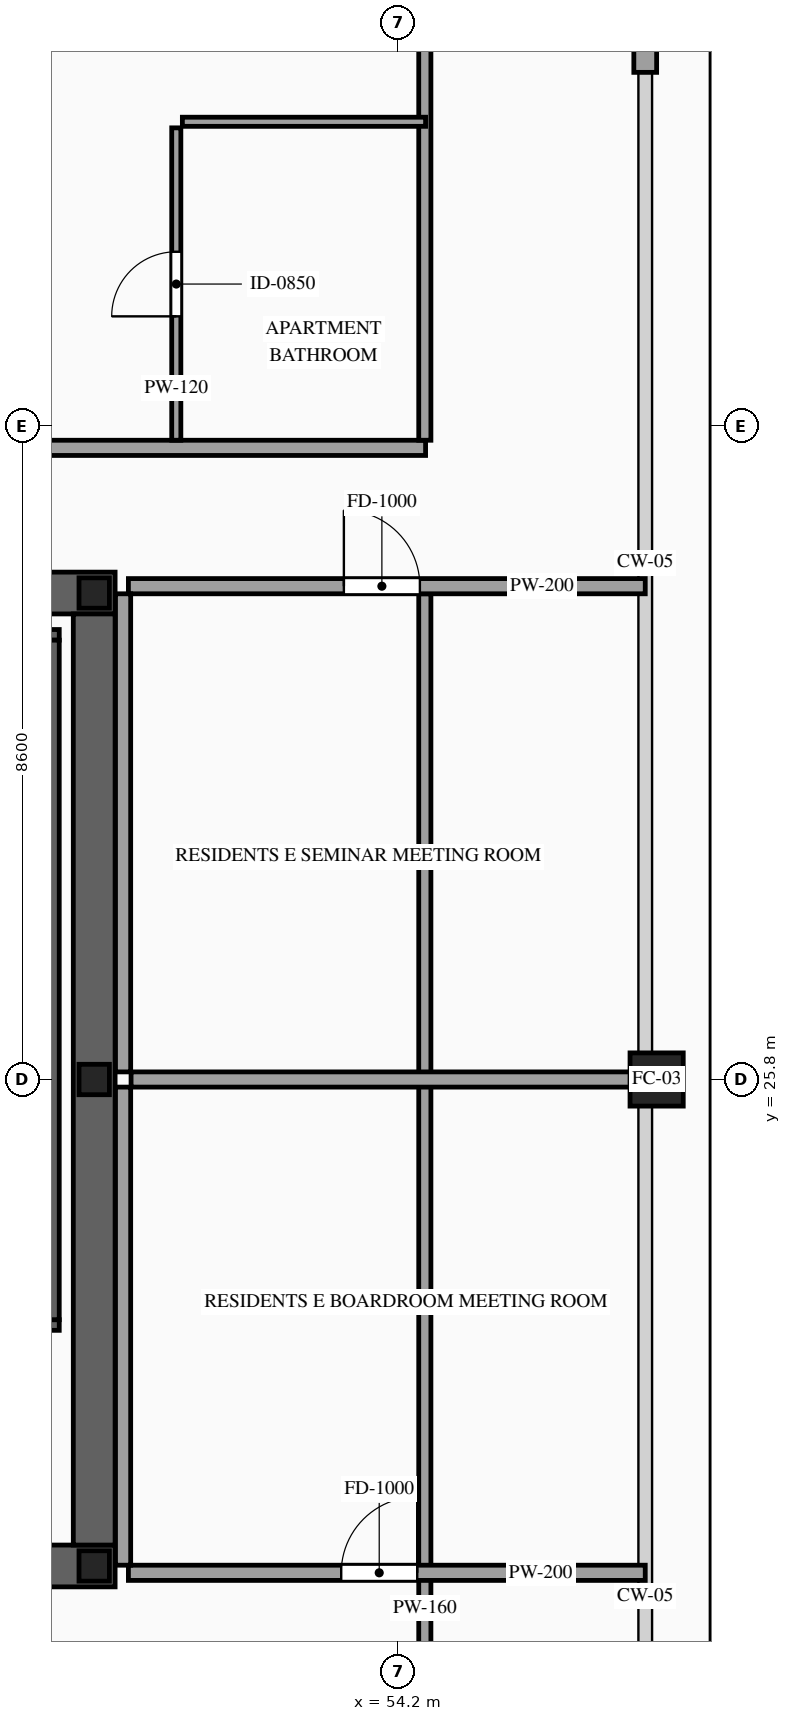
"""IFC4 building model, lengths in metres.
Left out: names, types, materials, properties, quantities, classifications, styles, units other than length and angle.
Written with IfcOpenShell. Run it as: python <this file> out.ifc"""

import sys

from ifc_helpers import new_model, si_unit, direction, frame, frame_2d, origin, origin_2d, place, context, subcontext, project, spatial, rectangle, hollow_rectangle, i_section, extrude, source, transform, mapped, element, fill, save


model = new_model("IFC4")
c1 = context("Model", 3, precision=1e-05, world=origin(), true_north=direction((0.0, 1.0)))
c2 = subcontext(c1, "Body", "Model", "MODEL_VIEW")
j1 = project(units=[si_unit("LENGTHUNIT", "METRE"), si_unit("PLANEANGLEUNIT", "RADIAN")], contexts=[c1])
p1 = place(None, origin())
s1 = spatial("IfcSite", under=j1, at=p1, CompositionType="ELEMENT")
p2 = place(p1, origin())
s2 = spatial("IfcBuilding", under=s1, at=p2, CompositionType="ELEMENT")
p3 = place(p2, frame((0.0, 0.0, 231.1)))
s3 = spatial("IfcBuildingStorey", under=s2, at=p3, CompositionType="ELEMENT", Elevation=231.1)
p4 = place(p3, frame((23.525, 19.4, 0.0), z_axis=(0.0, 0.0, 1.0), x_axis=(1.0, 0.0, 0.0)))
e1 = element("IfcWall", 1, at=p4, inside=s3, PredefinedType="SHEAR", context=c2, shape_type="SweptSolid", body=[
    extrude(rectangle(XDim=26.95, YDim=0.55, at=frame_2d((13.475, 0.0))), origin(), (0.0, 0.0, 1.0), 3.5),
])
p5 = place(p4, frame((1.925, 0.0, 0.0)))
e2 = element("IfcOpeningElement", 2, at=p5, cuts=e1, PredefinedType="OPENING", context=c2, shape_type="SweptSolid", body=[
    extrude(rectangle(XDim=1.1, YDim=2.2, at=frame_2d((0.55, 1.1))), frame((0.0, 0.29, 0.0), z_axis=(0.0, -1.0, 0.0), x_axis=(1.0, 0.0, 0.0)), (0.0, 0.0, 1.0), 0.58),
])
p6 = place(p4, frame((9.825, 0.0, 0.0)))
e3 = element("IfcOpeningElement", 3, at=p6, cuts=e1, PredefinedType="OPENING", context=c2, shape_type="SweptSolid", body=[
    extrude(rectangle(XDim=1.1, YDim=2.2, at=frame_2d((0.55, 1.1))), frame((0.0, 0.29, 0.0), z_axis=(0.0, -1.0, 0.0), x_axis=(1.0, 0.0, 0.0)), (0.0, 0.0, 1.0), 0.58),
])
p7 = place(p4, frame((23.025, 0.0, 0.0)))
e4 = element("IfcOpeningElement", 4, at=p7, cuts=e1, PredefinedType="OPENING", context=c2, shape_type="SweptSolid", body=[
    extrude(rectangle(XDim=1.1, YDim=2.2, at=frame_2d((0.55, 1.1))), frame((0.0, 0.29, 0.0), z_axis=(0.0, -1.0, 0.0), x_axis=(1.0, 0.0, 0.0)), (0.0, 0.0, 1.0), 0.58),
])
p8 = place(p4, frame((19.645, 0.0, 0.0)))
e5 = element("IfcOpeningElement", 5, at=p8, cuts=e1, PredefinedType="OPENING", context=c2, shape_type="SweptSolid", body=[
    extrude(rectangle(XDim=0.9, YDim=2.15, at=frame_2d((0.45, 1.075))), frame((0.0, 0.29, 0.0), z_axis=(0.0, -1.0, 0.0), x_axis=(1.0, 0.0, 0.0)), (0.0, 0.0, 1.0), 0.58),
])
p9 = place(p4, frame((18.205, 0.0, 0.0)))
e6 = element("IfcOpeningElement", 6, at=p9, cuts=e1, PredefinedType="OPENING", context=c2, shape_type="SweptSolid", body=[
    extrude(rectangle(XDim=0.9, YDim=2.15, at=frame_2d((0.45, 1.075))), frame((0.0, 0.29, 0.0), z_axis=(0.0, -1.0, 0.0), x_axis=(1.0, 0.0, 0.0)), (0.0, 0.0, 1.0), 0.58),
])
p10 = place(p3, frame((23.525, 32.2, 0.0), z_axis=(0.0, 0.0, 1.0), x_axis=(1.0, 0.0, 0.0)))
e7 = element("IfcWall", 7, at=p10, inside=s3, PredefinedType="SHEAR", context=c2, shape_type="SweptSolid", body=[
    extrude(rectangle(XDim=26.95, YDim=0.55, at=frame_2d((13.475, 0.0))), origin(), (0.0, 0.0, 1.0), 3.5),
])
p11 = place(p10, frame((4.545, 0.0, 0.0)))
e8 = element("IfcOpeningElement", 8, at=p11, cuts=e7, PredefinedType="OPENING", context=c2, shape_type="SweptSolid", body=[
    extrude(rectangle(XDim=0.9, YDim=2.15, at=frame_2d((0.45, 1.075))), frame((0.0, 0.29, 0.0), z_axis=(0.0, -1.0, 0.0), x_axis=(1.0, 0.0, 0.0)), (0.0, 0.0, 1.0), 0.58),
])
p12 = place(p10, frame((9.825, 0.0, 0.0)))
e9 = element("IfcOpeningElement", 9, at=p12, cuts=e7, PredefinedType="OPENING", context=c2, shape_type="SweptSolid", body=[
    extrude(rectangle(XDim=1.1, YDim=2.2, at=frame_2d((0.55, 1.1))), frame((0.0, 0.29, 0.0), z_axis=(0.0, -1.0, 0.0), x_axis=(1.0, 0.0, 0.0)), (0.0, 0.0, 1.0), 0.58),
])
p13 = place(p10, frame((15.675, 0.0, 0.0)))
e10 = element("IfcOpeningElement", 10, at=p13, cuts=e7, PredefinedType="OPENING", context=c2, shape_type="SweptSolid", body=[
    extrude(rectangle(XDim=1.1, YDim=2.2, at=frame_2d((0.55, 1.1))), frame((0.0, 0.29, 0.0), z_axis=(0.0, -1.0, 0.0), x_axis=(1.0, 0.0, 0.0)), (0.0, 0.0, 1.0), 0.58),
])
p14 = place(p10, frame((19.645, 0.0, 0.0)))
e11 = element("IfcOpeningElement", 11, at=p14, cuts=e7, PredefinedType="OPENING", context=c2, shape_type="SweptSolid", body=[
    extrude(rectangle(XDim=0.9, YDim=2.15, at=frame_2d((0.45, 1.075))), frame((0.0, 0.29, 0.0), z_axis=(0.0, -1.0, 0.0), x_axis=(1.0, 0.0, 0.0)), (0.0, 0.0, 1.0), 0.58),
])
m1 = source(origin(), c2, "Body", "SweptSolid", [
    extrude(rectangle(XDim=12.25, YDim=0.55, at=frame_2d((6.125, 0.0))), origin(), (0.0, 0.0, 1.0), 3.5),
])
p15 = place(p3, frame((50.2, 19.675, 0.0), z_axis=(0.0, 0.0, 1.0), x_axis=(0.0, 1.0, 0.0)))
e12 = element("IfcWall", 12, at=p15, inside=s3, PredefinedType="SHEAR", context=c2, shape_type="MappedRepresentation", body=[
    mapped(m1, transform((0.0, 0.0, 0.0), scale=1.0)),
])
m2 = source(origin(), c2, "Body", "SweptSolid", [
    extrude(i_section(OverallWidth=0.4, OverallDepth=0.4, WebThickness=0.013, FlangeThickness=0.021, at=origin_2d()), origin(), (0.0, 0.0, 1.0), 3.5),
])
for number, where, z_axis, x_axis in (
    (13, (50.2, 19.4, 0.0), (0.0, 0.0, 1.0), (1.0, 0.0, 0.0)),
    (14, (50.2, 25.8, 0.0), (0.0, 0.0, 1.0), (1.0, 0.0, 0.0)),
    (15, (50.2, 32.2, 0.0), (0.0, 0.0, 1.0), (1.0, 0.0, 0.0)),
):
    element("IfcColumn", number, at=place(p3, frame(where, z_axis=z_axis, x_axis=x_axis)), inside=s3, PredefinedType="COLUMN", context=c2, shape_type="MappedRepresentation", body=[
        mapped(m2, transform((0.0, 0.0, 0.0), scale=1.0)),
    ])
m3 = source(origin(), c2, "Body", "SweptSolid", [
    extrude(hollow_rectangle(XDim=0.7, YDim=0.7, WallThickness=0.032, at=origin_2d()), origin(), (0.0, 0.0, 1.0), 3.5),
])
p16 = place(p3, frame((57.6, 25.8, 0.0), z_axis=(0.0, 0.0, 1.0), x_axis=(1.0, 0.0, 0.0)))
e16 = element("IfcColumn", 16, at=p16, inside=s3, PredefinedType="COLUMN", context=c2, shape_type="MappedRepresentation", body=[
    mapped(m3, transform((0.0, 0.0, 0.0), scale=1.0)),
])
m4 = source(origin(), c2, "Body", "SweptSolid", [
    extrude(rectangle(XDim=3.15, YDim=0.3, at=frame_2d((1.575, 0.0))), origin(), (0.0, 0.0, 1.0), 2.835),
])
p17 = place(p3, frame((57.45, 39.05, 0.0), z_axis=(0.0, 0.0, 1.0), x_axis=(0.0, 1.0, 0.0)))
e17 = element("IfcWall", 17, at=p17, inside=s3, PredefinedType="SOLIDWALL", context=c2, shape_type="MappedRepresentation", body=[
    mapped(m4, transform((0.0, 0.0, 0.0), scale=1.0)),
])
p18 = place(p3, frame((46.46, 22.57, 0.0), z_axis=(0.0, 0.0, 1.0), x_axis=(1.0, 0.0, 0.0)))
e18 = element("IfcWall", 18, at=p18, inside=s3, PredefinedType="SOLIDWALL", context=c2, shape_type="SweptSolid", body=[
    extrude(rectangle(XDim=3.28, YDim=0.14, at=frame_2d((1.64, 0.0))), origin(), (0.0, 0.0, 1.0), 3.28),
])
p19 = place(p18, frame((1.09, 0.0, 0.0)))
e19 = element("IfcOpeningElement", 19, at=p19, cuts=e18, PredefinedType="OPENING", context=c2, shape_type="SweptSolid", body=[
    extrude(rectangle(XDim=1.1, YDim=2.2, at=frame_2d((0.55, 1.1))), frame((0.0, 0.085, 0.0), z_axis=(0.0, -1.0, 0.0), x_axis=(1.0, 0.0, 0.0)), (0.0, 0.0, 1.0), 0.17),
])
m5 = source(origin(), c2, "Body", "SweptSolid", [
    extrude(rectangle(XDim=3.28, YDim=0.14, at=frame_2d((1.64, 0.0))), origin(), (0.0, 0.0, 1.0), 3.28),
])
p20 = place(p3, frame((46.46, 31.65, 0.0), z_axis=(0.0, 0.0, 1.0), x_axis=(1.0, 0.0, 0.0)))
e20 = element("IfcWall", 20, at=p20, inside=s3, PredefinedType="SOLIDWALL", context=c2, shape_type="MappedRepresentation", body=[
    mapped(m5, transform((0.0, 0.0, 0.0), scale=1.0)),
])
m6 = source(origin(), c2, "Body", "SweptSolid", [
    extrude(rectangle(XDim=8.94, YDim=0.14, at=frame_2d((4.47, 0.0))), origin(), (0.0, 0.0, 1.0), 3.28),
])
p21 = place(p3, frame((49.67, 22.64, 0.0), z_axis=(0.0, 0.0, 1.0), x_axis=(0.0, 1.0, 0.0)))
e21 = element("IfcWall", 21, at=p21, inside=s3, PredefinedType="SOLIDWALL", context=c2, shape_type="MappedRepresentation", body=[
    mapped(m6, transform((0.0, 0.0, 0.0), scale=1.0)),
])
p22 = place(p3, frame((37.08, 34.11, 0.0), z_axis=(0.0, 0.0, 1.0), x_axis=(1.0, 0.0, 0.0)))
e22 = element("IfcWall", 22, at=p22, inside=s3, PredefinedType="PARTITIONING", context=c2, shape_type="SweptSolid", body=[
    extrude(rectangle(XDim=17.48, YDim=0.2, at=frame_2d((8.74, 0.0))), origin(), (0.0, 0.0, 1.0), 3.28),
])
p23 = place(p22, frame((8.34, 0.0, 0.0)))
e23 = element("IfcOpeningElement", 23, at=p23, cuts=e22, PredefinedType="OPENING", context=c2, shape_type="SweptSolid", body=[
    extrude(rectangle(XDim=1.0, YDim=2.2, at=frame_2d((0.5, 1.1))), frame((0.0, 0.115, 0.0), z_axis=(0.0, -1.0, 0.0), x_axis=(1.0, 0.0, 0.0)), (0.0, 0.0, 1.0), 0.23),
])
m7 = source(origin(), c2, "Body", "SweptSolid", [
    extrude(rectangle(XDim=11.89, YDim=0.16, at=frame_2d((5.945, 0.0))), origin(), (0.0, 0.0, 1.0), 3.28),
])
p24 = place(p3, frame((54.55, 34.21, 0.0), z_axis=(0.0, 0.0, 1.0), x_axis=(0.0, 1.0, 0.0)))
e24 = element("IfcWall", 24, at=p24, inside=s3, PredefinedType="PARTITIONING", context=c2, shape_type="MappedRepresentation", body=[
    mapped(m7, transform((0.0, 0.0, 0.0), scale=1.0)),
])
m8 = source(origin(), c2, "Body", "SweptSolid", [
    extrude(rectangle(XDim=3.2, YDim=0.12, at=frame_2d((1.6, 0.0))), origin(), (0.0, 0.0, 1.0), 3.28),
])
p25 = place(p3, frame((51.36, 38.4, 0.0), z_axis=(0.0, 0.0, 1.0), x_axis=(1.0, 0.0, 0.0)))
e25 = element("IfcWall", 25, at=p25, inside=s3, PredefinedType="PARTITIONING", context=c2, shape_type="MappedRepresentation", body=[
    mapped(m8, transform((0.0, 0.0, 0.0), scale=1.0)),
])
p26 = place(p3, frame((51.28, 34.21, 0.0), z_axis=(0.0, 0.0, 1.0), x_axis=(0.0, 1.0, 0.0)))
e26 = element("IfcWall", 26, at=p26, inside=s3, PredefinedType="PARTITIONING", context=c2, shape_type="SweptSolid", body=[
    extrude(rectangle(XDim=4.11, YDim=0.12, at=frame_2d((2.055, 0.0))), origin(), (0.0, 0.0, 1.0), 3.28),
])
p27 = place(p26, frame((1.63, 0.0, 0.0)))
e27 = element("IfcOpeningElement", 27, at=p27, cuts=e26, PredefinedType="OPENING", context=c2, shape_type="SweptSolid", body=[
    extrude(rectangle(XDim=0.85, YDim=2.1, at=frame_2d((0.425, 1.05))), frame((0.0, 0.075, 0.0), z_axis=(0.0, -1.0, 0.0), x_axis=(1.0, 0.0, 0.0)), (0.0, 0.0, 1.0), 0.15),
])
m9 = source(origin(), c2, "Body", "SweptSolid", [
    extrude(rectangle(XDim=26.69, YDim=0.16, at=frame_2d((13.345, 0.0))), origin(), (0.0, 0.0, 1.0), 3.28),
])
p28 = place(p3, frame((54.55, 5.5, 0.0), z_axis=(0.0, 0.0, 1.0), x_axis=(0.0, 1.0, 0.0)))
e28 = element("IfcWall", 28, at=p28, inside=s3, PredefinedType="PARTITIONING", context=c2, shape_type="MappedRepresentation", body=[
    mapped(m9, transform((0.0, 0.0, 0.0), scale=1.0)),
])
p29 = place(p3, frame((50.65, 19.31, 0.0), z_axis=(0.0, 0.0, 1.0), x_axis=(1.0, 0.0, 0.0)))
e29 = element("IfcWall", 29, at=p29, inside=s3, PredefinedType="PARTITIONING", context=c2, shape_type="SweptSolid", body=[
    extrude(rectangle(XDim=6.8, YDim=0.2, at=frame_2d((3.4, 0.0))), origin(), (0.0, 0.0, 1.0), 2.825),
])
p30 = place(p29, frame((2.8, 0.0, 0.0)))
e30 = element("IfcOpeningElement", 30, at=p30, cuts=e29, PredefinedType="OPENING", context=c2, shape_type="SweptSolid", body=[
    extrude(rectangle(XDim=1.0, YDim=2.2, at=frame_2d((0.5, 1.1))), frame((0.0, 0.115, 0.0), z_axis=(0.0, -1.0, 0.0), x_axis=(1.0, 0.0, 0.0)), (0.0, 0.0, 1.0), 0.23),
])
m10 = source(origin(), c2, "Body", "SweptSolid", [
    extrude(rectangle(XDim=6.765, YDim=0.2, at=frame_2d((3.382, 0.0))), origin(), (0.0, 0.0, 1.0), 2.787),
])
p31 = place(p3, frame((50.685, 25.8, 0.0), z_axis=(0.0, 0.0, 1.0), x_axis=(1.0, 0.0, 0.0)))
e31 = element("IfcWall", 31, at=p31, inside=s3, PredefinedType="PARTITIONING", context=c2, shape_type="MappedRepresentation", body=[
    mapped(m10, transform((0.0, 0.0, 0.0), scale=1.0)),
])
m11 = source(origin(), c2, "Body", "SweptSolid", [
    extrude(rectangle(XDim=6.29, YDim=0.2, at=frame_2d((3.145, 0.0))), origin(), (0.0, 0.0, 1.0), 3.28),
])
p32 = place(p3, frame((50.58, 19.41, 0.0), z_axis=(0.0, 0.0, 1.0), x_axis=(0.0, 1.0, 0.0)))
e32 = element("IfcWall", 32, at=p32, inside=s3, PredefinedType="PARTITIONING", context=c2, shape_type="MappedRepresentation", body=[
    mapped(m11, transform((0.0, 0.0, 0.0), scale=1.0)),
])
p33 = place(p3, frame((50.65, 32.29, 0.0), z_axis=(0.0, 0.0, 1.0), x_axis=(1.0, 0.0, 0.0)))
e33 = element("IfcWall", 33, at=p33, inside=s3, PredefinedType="PARTITIONING", context=c2, shape_type="SweptSolid", body=[
    extrude(rectangle(XDim=6.8, YDim=0.2, at=frame_2d((3.4, 0.0))), origin(), (0.0, 0.0, 1.0), 2.825),
])
p34 = place(p33, frame((2.835, 0.0, 0.0)))
e34 = element("IfcOpeningElement", 34, at=p34, cuts=e33, PredefinedType="OPENING", context=c2, shape_type="SweptSolid", body=[
    extrude(rectangle(XDim=1.0, YDim=2.2, at=frame_2d((0.5, 1.1))), frame((0.0, 0.115, 0.0), z_axis=(0.0, -1.0, 0.0), x_axis=(1.0, 0.0, 0.0)), (0.0, 0.0, 1.0), 0.23),
])
p35 = place(p3, frame((50.58, 25.9, 0.0), z_axis=(0.0, 0.0, 1.0), x_axis=(0.0, 1.0, 0.0)))
e35 = element("IfcWall", 35, at=p35, inside=s3, PredefinedType="PARTITIONING", context=c2, shape_type="MappedRepresentation", body=[
    mapped(m11, transform((0.0, 0.0, 0.0), scale=1.0)),
])
m12 = source(origin(), c2, "Body", "SweptSolid", [
    extrude(rectangle(XDim=0.85, YDim=2.1, at=frame_2d((0.425, 1.05))), frame((0.0, 0.025, 0.0), z_axis=(0.0, -1.0, 0.0), x_axis=(1.0, 0.0, 0.0)), (0.0, 0.0, 1.0), 0.05),
])
p36 = place(p27, origin())
e36 = element("IfcDoor", 36, at=p36, inside=s3, OperationType="SINGLE_SWING_LEFT", PredefinedType="DOOR", context=c2, shape_type="MappedRepresentation", body=[
    mapped(m12, transform((0.0, 0.0, 0.0), scale=1.0)),
])
fill(e27, e36)
m13 = source(origin(), c2, "Body", "SweptSolid", [
    extrude(rectangle(XDim=1.0, YDim=2.2, at=frame_2d((0.5, 1.1))), frame((0.0, 0.025, 0.0), z_axis=(0.0, -1.0, 0.0), x_axis=(1.0, 0.0, 0.0)), (0.0, 0.0, 1.0), 0.05),
])
p37 = place(p30, origin())
e37 = element("IfcDoor", 37, at=p37, inside=s3, OperationType="SINGLE_SWING_RIGHT", PredefinedType="DOOR", context=c2, shape_type="MappedRepresentation", body=[
    mapped(m13, transform((0.0, 0.0, 0.0), scale=1.0)),
])
fill(e30, e37)
p38 = place(p34, origin())
e38 = element("IfcDoor", 38, at=p38, inside=s3, OperationType="SINGLE_SWING_LEFT", PredefinedType="DOOR", context=c2, shape_type="MappedRepresentation", body=[
    mapped(m13, transform((0.0, 0.0, 0.0), scale=1.0)),
])
fill(e34, e38)
save(model, sys.argv[1])
